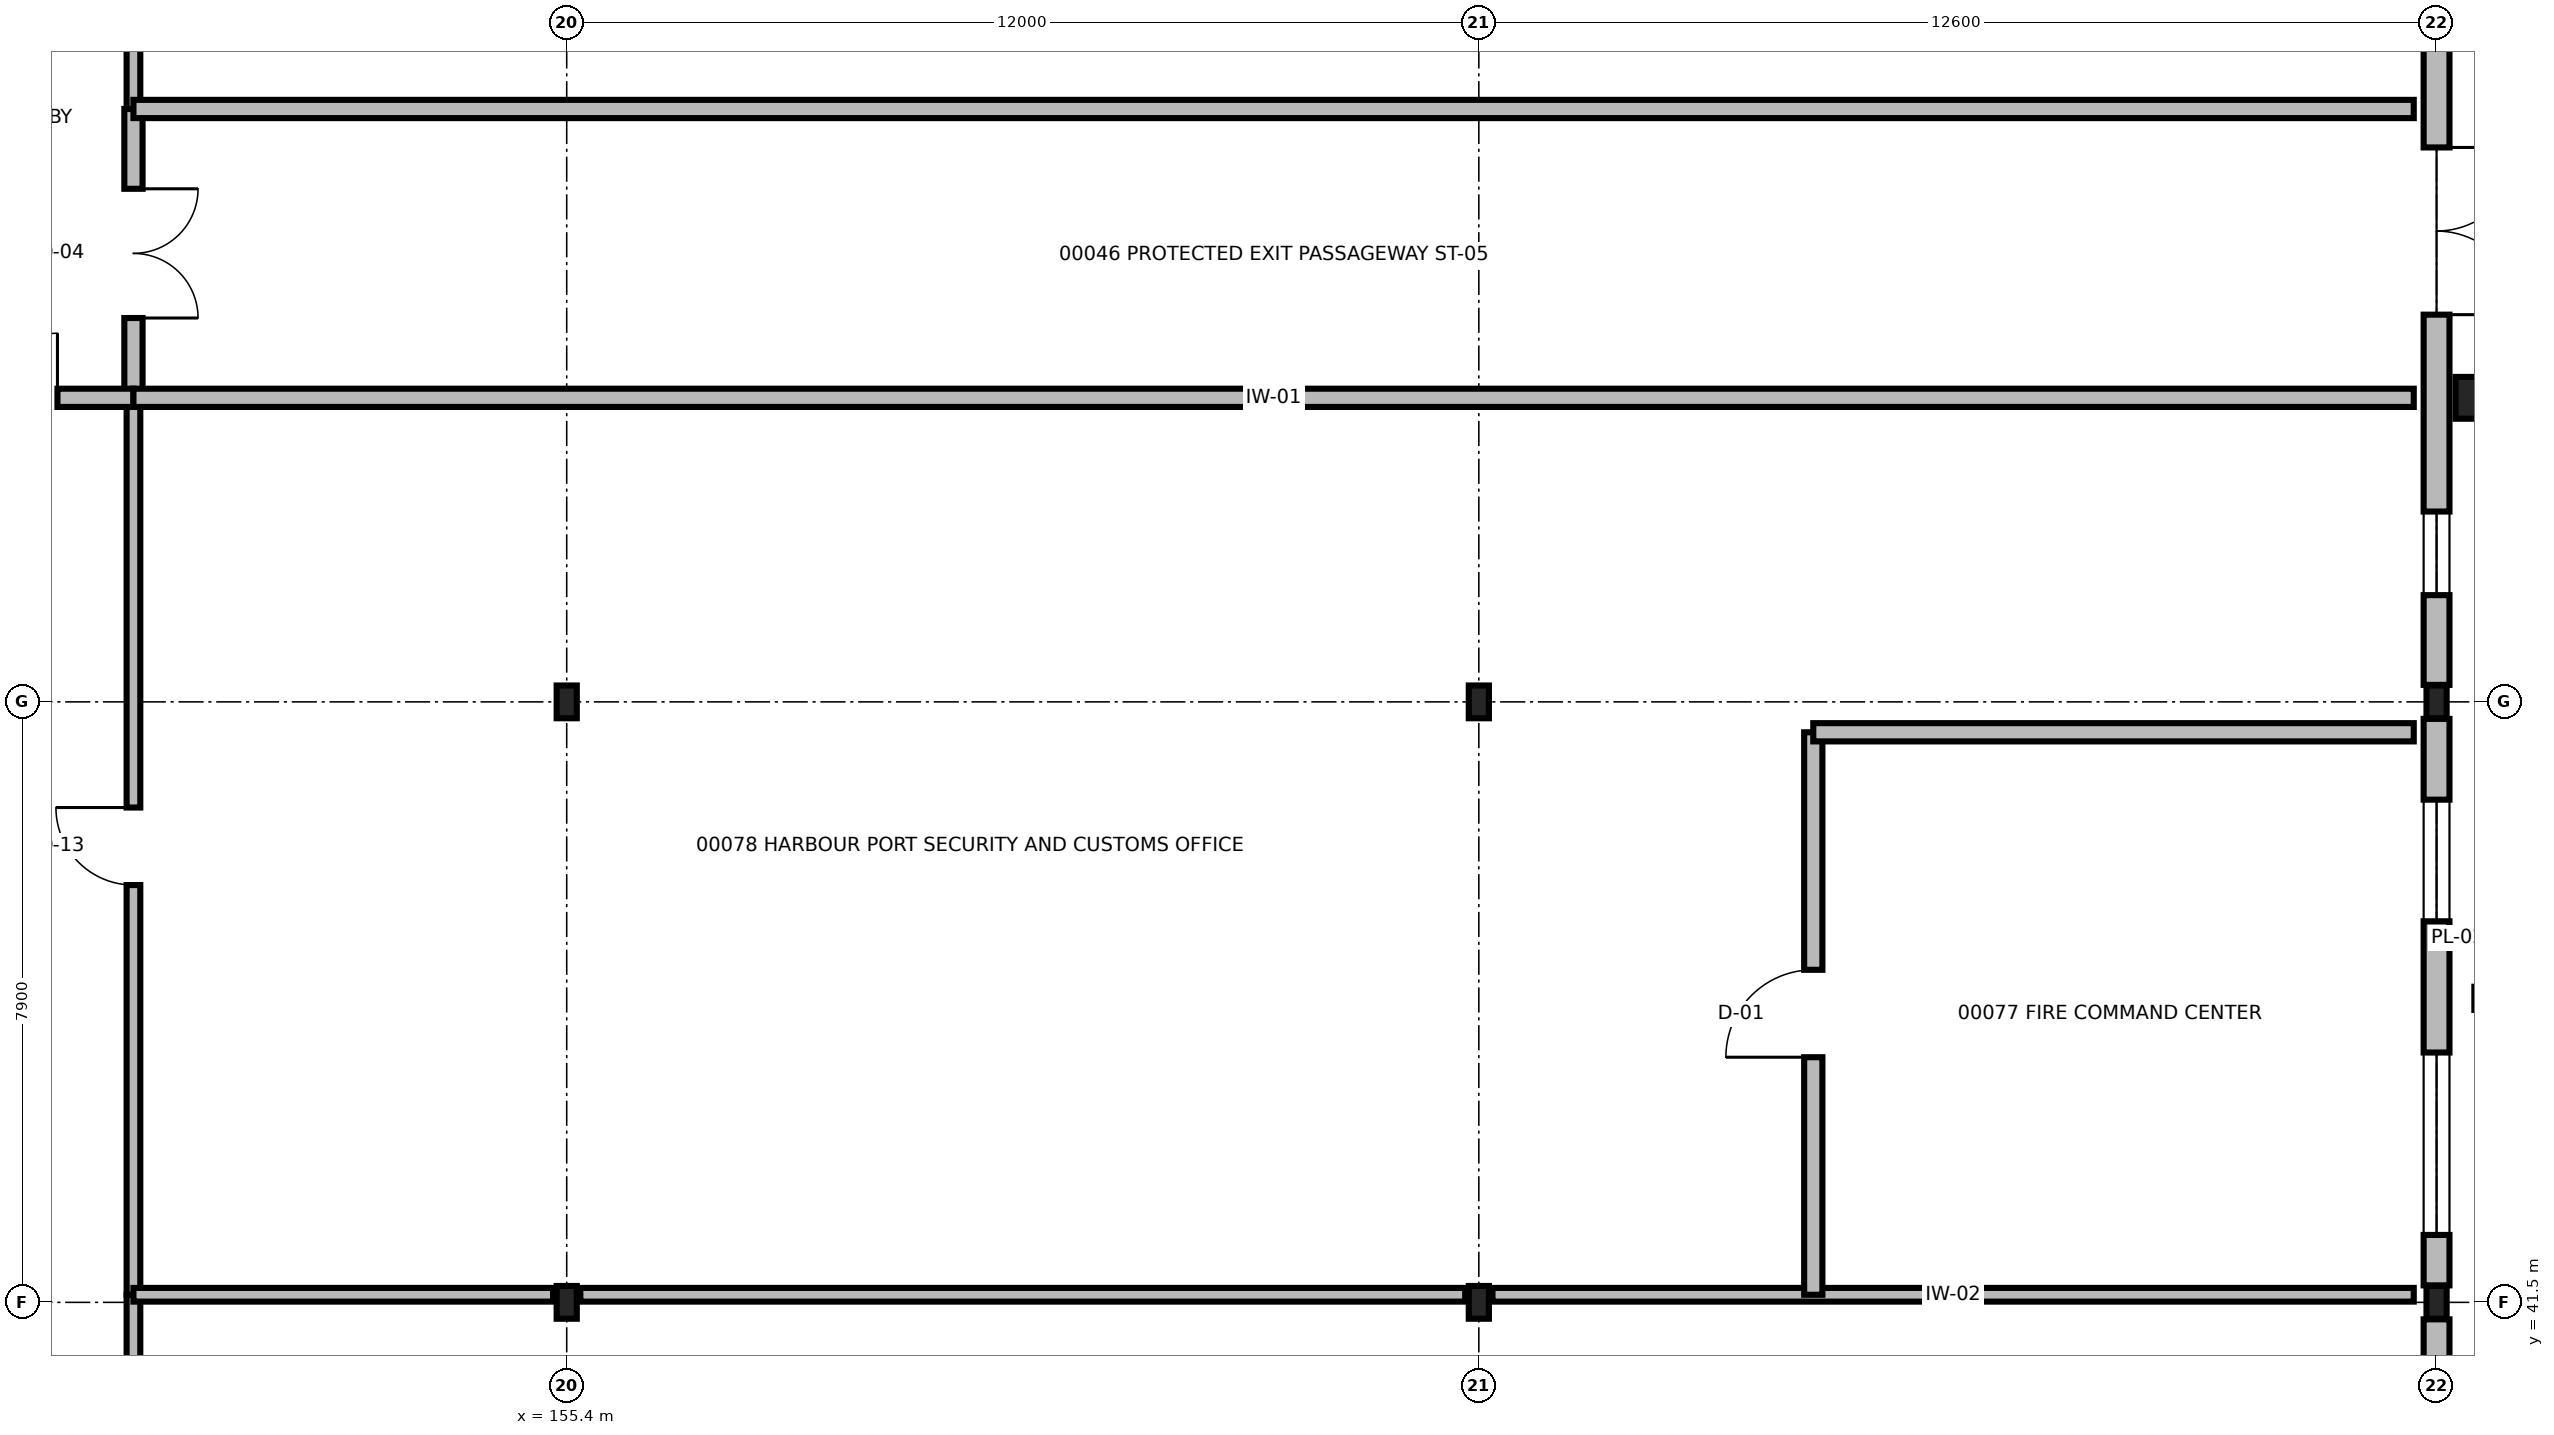
"""IFC4 building model, lengths in metres.
Left out: names, types, materials, properties, quantities, classifications, styles, units other than length and angle.
Written with IfcOpenShell. Run it as: python <this file> out.ifc"""

import sys

from ifc_helpers import new_model, si_unit, direction, frame, frame_2d, origin, origin_2d, place, context, subcontext, project, spatial, rectangle, hollow_rectangle, i_section, extrude, element, fill, save


model = new_model("IFC4")
c1 = context("Model", 3, precision=1e-05, world=origin(), true_north=direction((0.0, 1.0)))
c2 = subcontext(c1, "Body", "Model", "MODEL_VIEW")
j1 = project(units=[si_unit("LENGTHUNIT", "METRE"), si_unit("PLANEANGLEUNIT", "RADIAN")], contexts=[c1])
p1 = place(None, origin())
s1 = spatial("IfcSite", under=j1, at=p1, CompositionType="ELEMENT")
p2 = place(p1, origin())
s2 = spatial("IfcBuilding", under=s1, at=p2, CompositionType="ELEMENT")
p3 = place(p2, origin())
s3 = spatial("IfcBuildingStorey", under=s2, at=p3, CompositionType="ELEMENT", Elevation=0.0)
for number, where, z_axis, x_axis in (
    (1, (155.4, 41.5, 0.0), (0.0, 0.0, 1.0), (1.0, 0.0, 0.0)),
    (2, (155.4, 49.4, 0.0), (0.0, 0.0, 1.0), (1.0, 0.0, 0.0)),
    (3, (167.4, 41.5, 0.0), (0.0, 0.0, 1.0), (1.0, 0.0, 0.0)),
    (4, (167.4, 49.4, 0.0), (0.0, 0.0, 1.0), (1.0, 0.0, 0.0)),
    (5, (180.0, 41.5, 0.0), (0.0, 0.0, 1.0), (1.0, 0.0, 0.0)),
    (6, (180.0, 49.4, 0.0), (0.0, 0.0, 1.0), (1.0, 0.0, 0.0)),
):
    element("IfcColumn", number, at=place(p3, frame(where, z_axis=z_axis, x_axis=x_axis)), inside=s3, PredefinedType="COLUMN", context=c2, shape_type="SweptSolid", body=[
        extrude(i_section(OverallWidth=0.265, OverallDepth=0.431, WebThickness=0.015, FlangeThickness=0.025, at=origin_2d()), origin(), (0.0, 0.0, 1.0), 5.1),
    ])
p4 = place(p3, frame((180.65, 45.5, 0.0), z_axis=(0.0, 0.0, 1.0), x_axis=(0.0, 1.0, 0.0)))
e7 = element("IfcColumn", 7, at=p4, inside=s3, PredefinedType="PILASTER", context=c2, shape_type="SweptSolid", body=[
    extrude(hollow_rectangle(XDim=0.305, YDim=0.305, WallThickness=0.015, at=origin_2d()), origin(), (0.0, 0.0, 1.0), 5.1),
])
p5 = place(p3, frame((180.65, 53.4, 0.0), z_axis=(0.0, 0.0, 1.0), x_axis=(0.0, 1.0, 0.0)))
e8 = element("IfcColumn", 8, at=p5, inside=s3, PredefinedType="PILASTER", context=c2, shape_type="SweptSolid", body=[
    extrude(rectangle(XDim=0.55, YDim=0.8, at=origin_2d()), origin(), (0.0, 0.0, 1.0), 5.1),
])
p6 = place(p3, frame((180.0, 41.277, 0.0), z_axis=(0.0, 0.0, 1.0), x_axis=(0.0, -1.0, 0.0)))
e9 = element("IfcWall", 9, at=p6, inside=s3, PredefinedType="SOLIDWALL", context=c2, shape_type="SweptSolid", body=[
    extrude(rectangle(XDim=7.453, YDim=0.34, at=frame_2d((3.727, 0.0))), origin(), (0.0, 0.0, 1.0), 4.123),
])
p7 = place(p6, frame((1.138, 0.0, 1.0)))
e10 = element("IfcOpeningElement", 10, at=p7, cuts=e9, PredefinedType="OPENING", context=c2, shape_type="SweptSolid", body=[
    extrude(rectangle(XDim=1.45, YDim=1.2, at=frame_2d((0.725, 0.6))), frame((0.0, 0.18, 0.0), z_axis=(0.0, -1.0, 0.0), x_axis=(1.0, 0.0, 0.0)), (0.0, 0.0, 1.0), 0.36),
])
p8 = place(p6, frame((4.49, 0.0, 1.0)))
e11 = element("IfcOpeningElement", 11, at=p8, cuts=e9, PredefinedType="OPENING", context=c2, shape_type="SweptSolid", body=[
    extrude(rectangle(XDim=2.2, YDim=1.75, at=frame_2d((1.1, 0.875))), frame((0.0, 0.18, 0.0), z_axis=(0.0, -1.0, 0.0), x_axis=(1.0, 0.0, 0.0)), (0.0, 0.0, 1.0), 0.36),
])
p9 = place(p3, frame((180.0, 49.177, 0.0), z_axis=(0.0, 0.0, 1.0), x_axis=(0.0, -1.0, 0.0)))
e12 = element("IfcWall", 12, at=p9, inside=s3, PredefinedType="SOLIDWALL", context=c2, shape_type="SweptSolid", body=[
    extrude(rectangle(XDim=7.453, YDim=0.34, at=frame_2d((3.727, 0.0))), origin(), (0.0, 0.0, 1.0), 4.123),
])
p10 = place(p9, frame((1.063, 0.0, 1.0)))
e13 = element("IfcOpeningElement", 13, at=p10, cuts=e12, PredefinedType="OPENING", context=c2, shape_type="SweptSolid", body=[
    extrude(rectangle(XDim=1.6, YDim=1.2, at=frame_2d((0.8, 0.6))), frame((0.0, 0.18, 0.0), z_axis=(0.0, -1.0, 0.0), x_axis=(1.0, 0.0, 0.0)), (0.0, 0.0, 1.0), 0.36),
])
p11 = place(p9, frame((4.39, 0.0, 1.0)))
e14 = element("IfcOpeningElement", 14, at=p11, cuts=e12, PredefinedType="OPENING", context=c2, shape_type="SweptSolid", body=[
    extrude(rectangle(XDim=2.4, YDim=1.75, at=frame_2d((1.2, 0.875))), frame((0.0, 0.18, 0.0), z_axis=(0.0, -1.0, 0.0), x_axis=(1.0, 0.0, 0.0)), (0.0, 0.0, 1.0), 0.36),
])
p12 = place(p3, frame((180.0, 58.277, 0.0), z_axis=(0.0, 0.0, 1.0), x_axis=(0.0, -1.0, 0.0)))
e15 = element("IfcWall", 15, at=p12, inside=s3, PredefinedType="SOLIDWALL", context=c2, shape_type="SweptSolid", body=[
    extrude(rectangle(XDim=8.653, YDim=0.34, at=frame_2d((4.327, 0.0))), origin(), (0.0, 0.0, 1.0), 4.222),
])
p13 = place(p12, frame((1.583, 0.0, 0.0)))
e16 = element("IfcOpeningElement", 16, at=p13, cuts=e15, PredefinedType="OPENING", context=c2, shape_type="SweptSolid", body=[
    extrude(rectangle(XDim=2.2, YDim=2.5, at=frame_2d((1.1, 1.25))), frame((0.0, 0.18, 0.0), z_axis=(0.0, -1.0, 0.0), x_axis=(1.0, 0.0, 0.0)), (0.0, 0.0, 1.0), 0.36),
])
p14 = place(p12, frame((6.372, 0.0, 1.0)))
e17 = element("IfcOpeningElement", 17, at=p14, cuts=e15, PredefinedType="OPENING", context=c2, shape_type="SweptSolid", body=[
    extrude(rectangle(XDim=1.1, YDim=1.45, at=frame_2d((0.55, 0.725))), frame((0.0, 0.18, 0.0), z_axis=(0.0, -1.0, 0.0), x_axis=(1.0, 0.0, 0.0)), (0.0, 0.0, 1.0), 0.36),
])
p15 = place(p3, frame((149.7, 33.4, 0.0), z_axis=(0.0, 0.0, 1.0), x_axis=(0.0, 1.0, 0.0)))
e18 = element("IfcWall", 18, at=p15, inside=s3, PredefinedType="PARTITIONING", context=c2, shape_type="SweptSolid", body=[
    extrude(rectangle(XDim=8.2, YDim=0.18, at=frame_2d((4.1, 0.0))), origin(), (0.0, 0.0, 1.0), 4.183),
])
p16 = place(p15, frame((3.56, 0.0, 0.0)))
e19 = element("IfcOpeningElement", 19, at=p16, cuts=e18, PredefinedType="OPENING", context=c2, shape_type="SweptSolid", body=[
    extrude(rectangle(XDim=1.08, YDim=2.2, at=frame_2d((0.54, 1.1))), frame((0.0, 0.1, 0.0), z_axis=(0.0, -1.0, 0.0), x_axis=(1.0, 0.0, 0.0)), (0.0, 0.0, 1.0), 0.2),
])
p17 = place(p3, frame((149.7, 41.6, 0.0), z_axis=(0.0, 0.0, 1.0), x_axis=(0.0, 1.0, 0.0)))
e20 = element("IfcWall", 20, at=p17, inside=s3, PredefinedType="PARTITIONING", context=c2, shape_type="SweptSolid", body=[
    extrude(rectangle(XDim=11.8, YDim=0.18, at=frame_2d((5.9, 0.0))), origin(), (0.0, 0.0, 1.0), 4.364),
])
p18 = place(p17, frame((5.39, 0.0, 0.0)))
e21 = element("IfcOpeningElement", 21, at=p18, cuts=e20, PredefinedType="OPENING", context=c2, shape_type="SweptSolid", body=[
    extrude(rectangle(XDim=1.02, YDim=2.2, at=frame_2d((0.51, 1.1))), frame((0.0, 0.1, 0.0), z_axis=(0.0, -1.0, 0.0), x_axis=(1.0, 0.0, 0.0)), (0.0, 0.0, 1.0), 0.2),
])
p19 = place(p3, frame((149.7, 53.4, 0.0), z_axis=(0.0, 0.0, 1.0), x_axis=(0.0, 1.0, 0.0)))
e22 = element("IfcWall", 22, at=p19, inside=s3, PredefinedType="SOLIDWALL", context=c2, shape_type="SweptSolid", body=[
    extrude(rectangle(XDim=3.8, YDim=0.24, at=frame_2d((1.9, 0.0))), origin(), (0.0, 0.0, 1.0), 4.72),
])
p20 = place(p19, frame((1.05, 0.0, 0.0)))
e23 = element("IfcOpeningElement", 23, at=p20, cuts=e22, PredefinedType="OPENING", context=c2, shape_type="SweptSolid", body=[
    extrude(rectangle(XDim=1.7, YDim=2.25, at=frame_2d((0.85, 1.125))), frame((0.0, 0.13, 0.0), z_axis=(0.0, -1.0, 0.0), x_axis=(1.0, 0.0, 0.0)), (0.0, 0.0, 1.0), 0.26),
])
p21 = place(p3, frame((149.7, 57.2, 0.0), z_axis=(0.0, 0.0, 1.0), x_axis=(0.0, 1.0, 0.0)))
e24 = element("IfcWall", 24, at=p21, inside=s3, PredefinedType="PARTITIONING", context=c2, shape_type="SweptSolid", body=[
    extrude(rectangle(XDim=19.0, YDim=0.18, at=frame_2d((9.5, 0.0))), origin(), (0.0, 0.0, 1.0), 4.183),
])
p22 = place(p21, frame((8.75, 0.0, 0.0)))
e25 = element("IfcOpeningElement", 25, at=p22, cuts=e24, PredefinedType="OPENING", context=c2, shape_type="SweptSolid", body=[
    extrude(rectangle(XDim=1.5, YDim=2.25, at=frame_2d((0.75, 1.125))), frame((0.0, 0.1, 0.0), z_axis=(0.0, -1.0, 0.0), x_axis=(1.0, 0.0, 0.0)), (0.0, 0.0, 1.0), 0.2),
])
p23 = place(p3, frame((149.7, 41.6, 0.0), z_axis=(0.0, 0.0, 1.0), x_axis=(1.0, 0.0, 0.0)))
e26 = element("IfcWall", 26, at=p23, inside=s3, PredefinedType="PARTITIONING", context=c2, shape_type="SweptSolid", body=[
    extrude(rectangle(XDim=5.521, YDim=0.18, at=frame_2d((2.76, 0.0))), origin(), (0.0, 0.0, 1.0), 4.183),
])
p24 = place(p3, frame((155.579, 41.6, 0.0), z_axis=(0.0, 0.0, 1.0), x_axis=(1.0, 0.0, 0.0)))
e27 = element("IfcWall", 27, at=p24, inside=s3, PredefinedType="PARTITIONING", context=c2, shape_type="SweptSolid", body=[
    extrude(rectangle(XDim=11.641, YDim=0.18, at=frame_2d((5.821, 0.0))), origin(), (0.0, 0.0, 1.0), 3.845),
])
p25 = place(p3, frame((167.579, 41.6, 0.0), z_axis=(0.0, 0.0, 1.0), x_axis=(1.0, 0.0, 0.0)))
e28 = element("IfcWall", 28, at=p25, inside=s3, PredefinedType="PARTITIONING", context=c2, shape_type="SweptSolid", body=[
    extrude(rectangle(XDim=12.121, YDim=0.18, at=frame_2d((6.06, 0.0))), origin(), (0.0, 0.0, 1.0), 3.785),
])
p26 = place(p3, frame((146.0, 53.4, 0.0), z_axis=(0.0, 0.0, 1.0), x_axis=(1.0, 0.0, 0.0)))
e29 = element("IfcWall", 29, at=p26, inside=s3, PredefinedType="SOLIDWALL", context=c2, shape_type="SweptSolid", body=[
    extrude(rectangle(XDim=3.7, YDim=0.24, at=frame_2d((1.85, 0.0))), origin(), (0.0, 0.0, 1.0), 4.102),
])
p27 = place(p26, frame((1.0, 0.0, 0.0)))
e30 = element("IfcOpeningElement", 30, at=p27, cuts=e29, PredefinedType="OPENING", context=c2, shape_type="SweptSolid", body=[
    extrude(rectangle(XDim=1.7, YDim=2.25, at=frame_2d((0.85, 1.125))), frame((0.0, 0.13, 0.0), z_axis=(0.0, -1.0, 0.0), x_axis=(1.0, 0.0, 0.0)), (0.0, 0.0, 1.0), 0.26),
])
for number, where, z_axis, x_axis in (
    (31, (149.7, 53.4, 0.0), (0.0, 0.0, 1.0), (1.0, 0.0, 0.0)),
    (32, (149.7, 57.2, 0.0), (0.0, 0.0, 1.0), (1.0, 0.0, 0.0)),
):
    element("IfcWall", number, at=place(p3, frame(where, z_axis=z_axis, x_axis=x_axis)), inside=s3, PredefinedType="SOLIDWALL", context=c2, shape_type="SweptSolid", body=[
        extrude(rectangle(XDim=30.0, YDim=0.24, at=frame_2d((15.0, 0.0))), origin(), (0.0, 0.0, 1.0), 4.102),
    ])
p28 = place(p3, frame((171.8, 41.6, 0.0), z_axis=(0.0, 0.0, 1.0), x_axis=(0.0, 1.0, 0.0)))
e33 = element("IfcWall", 33, at=p28, inside=s3, PredefinedType="SOLIDWALL", context=c2, shape_type="SweptSolid", body=[
    extrude(rectangle(XDim=7.4, YDim=0.24, at=frame_2d((3.7, 0.0))), origin(), (0.0, 0.0, 1.0), 4.72),
])
p29 = place(p28, frame((3.125, 0.0, 0.0)))
e34 = element("IfcOpeningElement", 34, at=p29, cuts=e33, PredefinedType="OPENING", context=c2, shape_type="SweptSolid", body=[
    extrude(rectangle(XDim=1.15, YDim=2.15, at=frame_2d((0.575, 1.075))), frame((0.0, 0.13, 0.0), z_axis=(0.0, -1.0, 0.0), x_axis=(1.0, 0.0, 0.0)), (0.0, 0.0, 1.0), 0.26),
])
p30 = place(p3, frame((171.8, 49.0, 0.0), z_axis=(0.0, 0.0, 1.0), x_axis=(1.0, 0.0, 0.0)))
e35 = element("IfcWall", 35, at=p30, inside=s3, PredefinedType="SOLIDWALL", context=c2, shape_type="SweptSolid", body=[
    extrude(rectangle(XDim=7.9, YDim=0.24, at=frame_2d((3.95, 0.0))), origin(), (0.0, 0.0, 1.0), 3.785),
])
p31 = place(p10, origin())
e36 = element("IfcWindow", 36, at=p31, inside=s3, PartitioningType="SINGLE_PANEL", PredefinedType="WINDOW", context=c2, shape_type="SweptSolid", body=[
    extrude(rectangle(XDim=1.6, YDim=1.2, at=frame_2d((0.8, 0.6))), frame((0.0, 0.03, 0.0), z_axis=(0.0, -1.0, 0.0), x_axis=(1.0, 0.0, 0.0)), (0.0, 0.0, 1.0), 0.06),
])
fill(e13, e36)
p32 = place(p11, origin())
e37 = element("IfcWindow", 37, at=p32, inside=s3, PartitioningType="SINGLE_PANEL", PredefinedType="WINDOW", context=c2, shape_type="SweptSolid", body=[
    extrude(rectangle(XDim=2.4, YDim=1.75, at=frame_2d((1.2, 0.875))), frame((0.0, 0.03, 0.0), z_axis=(0.0, -1.0, 0.0), x_axis=(1.0, 0.0, 0.0)), (0.0, 0.0, 1.0), 0.06),
])
fill(e14, e37)
p33 = place(p13, origin())
e38 = element("IfcDoor", 38, at=p33, inside=s3, OperationType="DOUBLE_DOOR_SINGLE_SWING", PredefinedType="DOOR", context=c2, shape_type="SweptSolid", body=[
    extrude(rectangle(XDim=2.2, YDim=2.5, at=frame_2d((1.1, 1.25))), frame((0.0, 0.025, 0.0), z_axis=(0.0, -1.0, 0.0), x_axis=(1.0, 0.0, 0.0)), (0.0, 0.0, 1.0), 0.05),
])
fill(e16, e38)
p34 = place(p14, origin())
e39 = element("IfcWindow", 39, at=p34, inside=s3, PartitioningType="SINGLE_PANEL", PredefinedType="WINDOW", context=c2, shape_type="SweptSolid", body=[
    extrude(rectangle(XDim=1.1, YDim=1.45, at=frame_2d((0.55, 0.725))), frame((0.0, 0.03, 0.0), z_axis=(0.0, -1.0, 0.0), x_axis=(1.0, 0.0, 0.0)), (0.0, 0.0, 1.0), 0.06),
])
fill(e17, e39)
p35 = place(p18, frame((1.02, 0.0, 0.0), z_axis=(0.0, 0.0, 1.0), x_axis=(-1.0, 0.0, 0.0)))
e40 = element("IfcDoor", 40, at=p35, inside=s3, OperationType="SINGLE_SWING_LEFT", PredefinedType="DOOR", context=c2, shape_type="SweptSolid", body=[
    extrude(rectangle(XDim=1.02, YDim=2.2, at=frame_2d((0.51, 1.1))), frame((0.0, 0.025, 0.0), z_axis=(0.0, -1.0, 0.0), x_axis=(1.0, 0.0, 0.0)), (0.0, 0.0, 1.0), 0.05),
])
fill(e21, e40)
p36 = place(p20, frame((1.7, 0.0, 0.0), z_axis=(0.0, 0.0, 1.0), x_axis=(-1.0, 0.0, 0.0)))
e41 = element("IfcDoor", 41, at=p36, inside=s3, OperationType="DOUBLE_DOOR_SINGLE_SWING", PredefinedType="DOOR", context=c2, shape_type="SweptSolid", body=[
    extrude(rectangle(XDim=1.7, YDim=2.25, at=frame_2d((0.85, 1.125))), frame((0.0, 0.025, 0.0), z_axis=(0.0, -1.0, 0.0), x_axis=(1.0, 0.0, 0.0)), (0.0, 0.0, 1.0), 0.05),
])
fill(e23, e41)
p37 = place(p27, origin())
e42 = element("IfcDoor", 42, at=p37, inside=s3, OperationType="DOUBLE_DOOR_SINGLE_SWING", PredefinedType="DOOR", context=c2, shape_type="SweptSolid", body=[
    extrude(rectangle(XDim=1.7, YDim=2.25, at=frame_2d((0.85, 1.125))), frame((0.0, 0.025, 0.0), z_axis=(0.0, -1.0, 0.0), x_axis=(1.0, 0.0, 0.0)), (0.0, 0.0, 1.0), 0.05),
])
fill(e30, e42)
p38 = place(p29, frame((1.15, 0.0, 0.0), z_axis=(0.0, 0.0, 1.0), x_axis=(-1.0, 0.0, 0.0)))
e43 = element("IfcDoor", 43, at=p38, inside=s3, OperationType="SINGLE_SWING_RIGHT", PredefinedType="DOOR", context=c2, shape_type="SweptSolid", body=[
    extrude(rectangle(XDim=1.15, YDim=2.15, at=frame_2d((0.575, 1.075))), frame((0.0, 0.025, 0.0), z_axis=(0.0, -1.0, 0.0), x_axis=(1.0, 0.0, 0.0)), (0.0, 0.0, 1.0), 0.05),
])
fill(e34, e43)
save(model, sys.argv[1])
